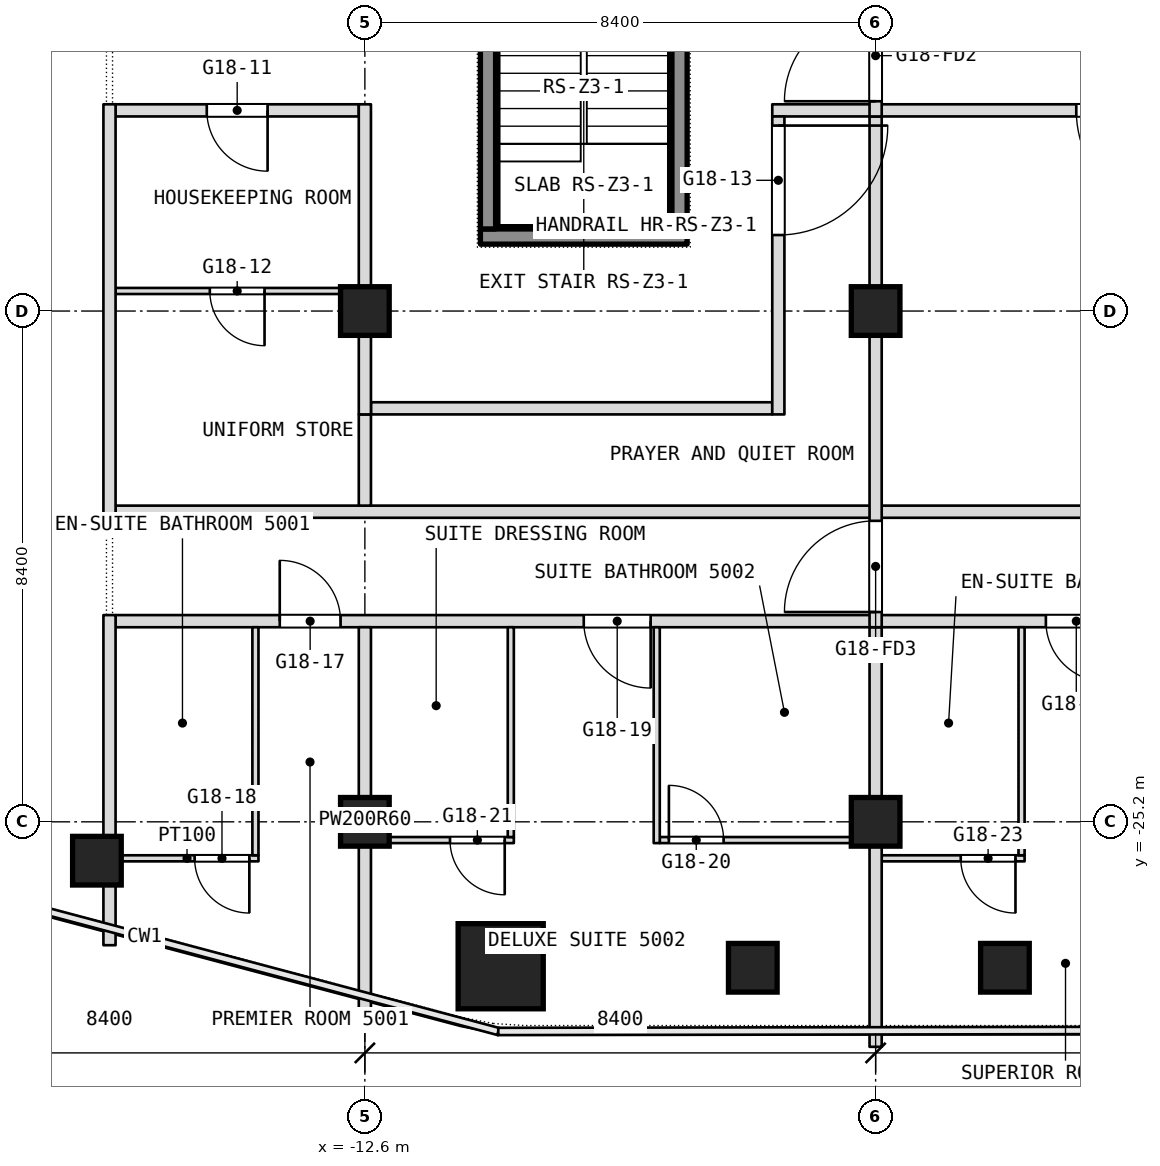
"""IFC4 building model, lengths in metres.
Left out: names, types, materials, properties, quantities, classifications, styles, units other than length and angle.
Written with IfcOpenShell. Run it as: python <this file> out.ifc"""

import sys

from ifc_helpers import new_model, si_unit, direction, frame, frame_2d, origin, origin_2d, place, context, subcontext, project, spatial, rectangle, extrude, element, fill, save


model = new_model("IFC4")
c1 = context("Model", 3, precision=1e-05, world=origin(), true_north=direction((0.0, 1.0)))
c2 = subcontext(c1, "Body", "Model", "MODEL_VIEW")
j1 = project(units=[si_unit("LENGTHUNIT", "METRE"), si_unit("PLANEANGLEUNIT", "RADIAN")], contexts=[c1])
p1 = place(None, origin())
s1 = spatial("IfcSite", under=j1, at=p1, CompositionType="ELEMENT")
p2 = place(p1, origin())
s2 = spatial("IfcBuilding", under=s1, at=p2, CompositionType="ELEMENT")
p3 = place(p2, frame((0.0, 0.0, 216.5)))
s3 = spatial("IfcBuildingStorey", under=s2, at=p3, CompositionType="ELEMENT", Elevation=216.5)
p4 = place(p3, frame((-10.366, -27.575, 0.0), z_axis=(0.0, 0.0, 1.0), x_axis=(1.0, 0.0, 0.0)))
e1 = element("IfcColumn", 1, at=p4, inside=s3, PredefinedType="COLUMN", context=c2, shape_type="SweptSolid", body=[
    extrude(rectangle(XDim=1.4, YDim=1.4, at=origin_2d()), origin(), (0.0, 0.0, 1.0), 3.6),
])
for number, where, z_axis, x_axis in (
    (2, (-12.6, -25.2, 0.0), (0.0, 0.0, 1.0), (1.0, 0.0, 0.0)),
    (3, (-12.6, -16.8, 0.0), (0.0, 0.0, 1.0), (1.0, 0.0, 0.0)),
    (4, (-4.2, -25.2, 0.0), (0.0, 0.0, 1.0), (1.0, 0.0, 0.0)),
    (5, (-4.2, -16.8, 0.0), (0.0, 0.0, 1.0), (1.0, 0.0, 0.0)),
    (6, (-2.073, -27.6, 0.0), (0.0, 0.0, 1.0), (1.0, 0.0, 0.0)),
    (7, (-6.22, -27.6, 0.0), (0.0, 0.0, 1.0), (1.0, 0.0, 0.0)),
    (8, (-17.007, -25.839, 0.0), (0.0, 0.0, 1.0), (1.0, 0.0, 0.0)),
):
    element("IfcColumn", number, at=place(p3, frame(where, z_axis=z_axis, x_axis=x_axis)), inside=s3, PredefinedType="COLUMN", context=c2, shape_type="SweptSolid", body=[
        extrude(rectangle(XDim=0.8, YDim=0.8, at=origin_2d()), origin(), (0.0, 0.0, 1.0), 3.6),
    ])
p5 = place(p3, frame((-16.7, -25.8, 0.0), z_axis=(0.0, 0.0, 1.0), x_axis=(1.0, 0.0, 0.0)))
e9 = element("IfcWall", 9, at=p5, inside=s3, PredefinedType="PARTITIONING", context=c2, shape_type="SweptSolid", body=[
    extrude(rectangle(XDim=2.35, YDim=0.1, at=frame_2d((1.175, 0.0))), origin(), (0.0, 0.0, 1.0), 3.34),
])
p6 = place(p5, frame((1.3, 0.0, 0.0)))
e10 = element("IfcOpeningElement", 10, at=p6, cuts=e9, PredefinedType="OPENING", context=c2, shape_type="SweptSolid", body=[
    extrude(rectangle(XDim=0.9, YDim=2.1, at=frame_2d((0.45, 1.05))), frame((0.0, 0.05, 0.0), z_axis=(0.0, -1.0, 0.0), x_axis=(1.0, 0.0, 0.0)), (0.0, 0.0, 1.0), 0.1),
])
p7 = place(p3, frame((-4.1, -25.8, 0.0), z_axis=(0.0, 0.0, 1.0), x_axis=(1.0, 0.0, 0.0)))
e11 = element("IfcWall", 11, at=p7, inside=s3, PredefinedType="PARTITIONING", context=c2, shape_type="SweptSolid", body=[
    extrude(rectangle(XDim=2.35, YDim=0.1, at=frame_2d((1.175, 0.0))), origin(), (0.0, 0.0, 1.0), 3.34),
])
p8 = place(p7, frame((1.3, 0.0, 0.0)))
e12 = element("IfcOpeningElement", 12, at=p8, cuts=e11, PredefinedType="OPENING", context=c2, shape_type="SweptSolid", body=[
    extrude(rectangle(XDim=0.9, YDim=2.1, at=frame_2d((0.45, 1.05))), frame((0.0, 0.05, 0.0), z_axis=(0.0, -1.0, 0.0), x_axis=(1.0, 0.0, 0.0)), (0.0, 0.0, 1.0), 0.1),
])
p9 = place(p3, frame((-12.5, -25.5, 0.0), z_axis=(0.0, 0.0, 1.0), x_axis=(1.0, 0.0, 0.0)))
e13 = element("IfcWall", 13, at=p9, inside=s3, PredefinedType="PARTITIONING", context=c2, shape_type="SweptSolid", body=[
    extrude(rectangle(XDim=2.35, YDim=0.1, at=frame_2d((1.175, 0.0))), origin(), (0.0, 0.0, 1.0), 3.34),
])
p10 = place(p9, frame((1.3, 0.0, 0.0)))
e14 = element("IfcOpeningElement", 14, at=p10, cuts=e13, PredefinedType="OPENING", context=c2, shape_type="SweptSolid", body=[
    extrude(rectangle(XDim=0.9, YDim=2.1, at=frame_2d((0.45, 1.05))), frame((0.0, 0.05, 0.0), z_axis=(0.0, -1.0, 0.0), x_axis=(1.0, 0.0, 0.0)), (0.0, 0.0, 1.0), 0.1),
])
p11 = place(p3, frame((-7.75, -25.5, 0.0), z_axis=(0.0, 0.0, 1.0), x_axis=(1.0, 0.0, 0.0)))
e15 = element("IfcWall", 15, at=p11, inside=s3, PredefinedType="PARTITIONING", context=c2, shape_type="SweptSolid", body=[
    extrude(rectangle(XDim=3.65, YDim=0.1, at=frame_2d((1.825, 0.0))), origin(), (0.0, 0.0, 1.0), 3.34),
])
p12 = place(p11, frame((0.15, 0.0, 0.0)))
e16 = element("IfcOpeningElement", 16, at=p12, cuts=e15, PredefinedType="OPENING", context=c2, shape_type="SweptSolid", body=[
    extrude(rectangle(XDim=0.9, YDim=2.1, at=frame_2d((0.45, 1.05))), frame((0.0, 0.05, 0.0), z_axis=(0.0, -1.0, 0.0), x_axis=(1.0, 0.0, 0.0)), (0.0, 0.0, 1.0), 0.1),
])
p13 = place(p3, frame((-16.7, -21.9, 0.0), z_axis=(0.0, 0.0, 1.0), x_axis=(1.0, 0.0, 0.0)))
e17 = element("IfcWall", 17, at=p13, inside=s3, PredefinedType="PARTITIONING", context=c2, shape_type="SweptSolid", body=[
    extrude(rectangle(XDim=33.4, YDim=0.2, at=frame_2d((16.7, 0.0))), origin(), (0.0, 0.0, 1.0), 3.34),
])
p14 = place(p13, frame((2.7, 0.0, 0.0)))
e18 = element("IfcOpeningElement", 18, at=p14, cuts=e17, PredefinedType="OPENING", context=c2, shape_type="SweptSolid", body=[
    extrude(rectangle(XDim=1.0, YDim=2.1, at=frame_2d((0.5, 1.05))), frame((0.0, 0.1, 0.0), z_axis=(0.0, -1.0, 0.0), x_axis=(1.0, 0.0, 0.0)), (0.0, 0.0, 1.0), 0.2),
])
p15 = place(p13, frame((7.7, 0.0, 0.0)))
e19 = element("IfcOpeningElement", 19, at=p15, cuts=e17, PredefinedType="OPENING", context=c2, shape_type="SweptSolid", body=[
    extrude(rectangle(XDim=1.1, YDim=2.1, at=frame_2d((0.55, 1.05))), frame((0.0, 0.1, 0.0), z_axis=(0.0, -1.0, 0.0), x_axis=(1.0, 0.0, 0.0)), (0.0, 0.0, 1.0), 0.2),
])
p16 = place(p13, frame((15.3, 0.0, 0.0)))
e20 = element("IfcOpeningElement", 20, at=p16, cuts=e17, PredefinedType="OPENING", context=c2, shape_type="SweptSolid", body=[
    extrude(rectangle(XDim=1.0, YDim=2.1, at=frame_2d((0.5, 1.05))), frame((0.0, 0.1, 0.0), z_axis=(0.0, -1.0, 0.0), x_axis=(1.0, 0.0, 0.0)), (0.0, 0.0, 1.0), 0.2),
])
p17 = place(p13, frame((17.1, 0.0, 0.0)))
e21 = element("IfcOpeningElement", 21, at=p17, cuts=e17, PredefinedType="OPENING", context=c2, shape_type="SweptSolid", body=[
    extrude(rectangle(XDim=1.0, YDim=2.1, at=frame_2d((0.5, 1.05))), frame((0.0, 0.1, 0.0), z_axis=(0.0, -1.0, 0.0), x_axis=(1.0, 0.0, 0.0)), (0.0, 0.0, 1.0), 0.2),
])
p18 = place(p13, frame((24.5, 0.0, 0.0)))
e22 = element("IfcOpeningElement", 22, at=p18, cuts=e17, PredefinedType="OPENING", context=c2, shape_type="SweptSolid", body=[
    extrude(rectangle(XDim=1.1, YDim=2.1, at=frame_2d((0.55, 1.05))), frame((0.0, 0.1, 0.0), z_axis=(0.0, -1.0, 0.0), x_axis=(1.0, 0.0, 0.0)), (0.0, 0.0, 1.0), 0.2),
])
p19 = place(p13, frame((32.1, 0.0, 0.0)))
e23 = element("IfcOpeningElement", 23, at=p19, cuts=e17, PredefinedType="OPENING", context=c2, shape_type="SweptSolid", body=[
    extrude(rectangle(XDim=1.0, YDim=2.1, at=frame_2d((0.5, 1.05))), frame((0.0, 0.1, 0.0), z_axis=(0.0, -1.0, 0.0), x_axis=(1.0, 0.0, 0.0)), (0.0, 0.0, 1.0), 0.2),
])
p20 = place(p3, frame((-16.7, -20.1, 0.0), z_axis=(0.0, 0.0, 1.0), x_axis=(1.0, 0.0, 0.0)))
e24 = element("IfcWall", 24, at=p20, inside=s3, PredefinedType="PARTITIONING", context=c2, shape_type="SweptSolid", body=[
    extrude(rectangle(XDim=33.4, YDim=0.2, at=frame_2d((16.7, 0.0))), origin(), (0.0, 0.0, 1.0), 3.34),
])
p21 = place(p3, frame((-12.5, -18.4, 0.0), z_axis=(0.0, 0.0, 1.0), x_axis=(1.0, 0.0, 0.0)))
e25 = element("IfcWall", 25, at=p21, inside=s3, PredefinedType="PARTITIONING", context=c2, shape_type="SweptSolid", body=[
    extrude(rectangle(XDim=6.6, YDim=0.2, at=frame_2d((3.3, 0.0))), origin(), (0.0, 0.0, 1.0), 3.34),
])
p22 = place(p3, frame((-16.7, -16.47, 0.0), z_axis=(0.0, 0.0, 1.0), x_axis=(1.0, 0.0, 0.0)))
e26 = element("IfcWall", 26, at=p22, inside=s3, PredefinedType="PARTITIONING", context=c2, shape_type="SweptSolid", body=[
    extrude(rectangle(XDim=4.0, YDim=0.1, at=frame_2d((2.0, 0.0))), origin(), (0.0, 0.0, 1.0), 3.34),
])
p23 = place(p22, frame((1.55, 0.0, 0.0)))
e27 = element("IfcOpeningElement", 27, at=p23, cuts=e26, PredefinedType="OPENING", context=c2, shape_type="SweptSolid", body=[
    extrude(rectangle(XDim=0.9, YDim=2.1, at=frame_2d((0.45, 1.05))), frame((0.0, 0.05, 0.0), z_axis=(0.0, -1.0, 0.0), x_axis=(1.0, 0.0, 0.0)), (0.0, 0.0, 1.0), 0.1),
])
p24 = place(p3, frame((-16.7, -13.5, 0.0), z_axis=(0.0, 0.0, 1.0), x_axis=(1.0, 0.0, 0.0)))
e28 = element("IfcWall", 28, at=p24, inside=s3, PredefinedType="PARTITIONING", context=c2, shape_type="SweptSolid", body=[
    extrude(rectangle(XDim=4.0, YDim=0.2, at=frame_2d((2.0, 0.0))), origin(), (0.0, 0.0, 1.0), 3.34),
])
p25 = place(p24, frame((1.5, 0.0, 0.0)))
e29 = element("IfcOpeningElement", 29, at=p25, cuts=e28, PredefinedType="OPENING", context=c2, shape_type="SweptSolid", body=[
    extrude(rectangle(XDim=1.0, YDim=2.1, at=frame_2d((0.5, 1.05))), frame((0.0, 0.1, 0.0), z_axis=(0.0, -1.0, 0.0), x_axis=(1.0, 0.0, 0.0)), (0.0, 0.0, 1.0), 0.2),
])
p26 = place(p3, frame((-5.9, -13.5, 0.0), z_axis=(0.0, 0.0, 1.0), x_axis=(1.0, 0.0, 0.0)))
e30 = element("IfcWall", 30, at=p26, inside=s3, PredefinedType="PARTITIONING", context=c2, shape_type="SweptSolid", body=[
    extrude(rectangle(XDim=11.6, YDim=0.2, at=frame_2d((5.8, 0.0))), origin(), (0.0, 0.0, 1.0), 3.34),
])
p27 = place(p26, frame((5.0, 0.0, 0.0)))
e31 = element("IfcOpeningElement", 31, at=p27, cuts=e30, PredefinedType="OPENING", context=c2, shape_type="SweptSolid", body=[
    extrude(rectangle(XDim=1.8, YDim=2.1, at=frame_2d((0.9, 1.05))), frame((0.0, 0.1, 0.0), z_axis=(0.0, -1.0, 0.0), x_axis=(1.0, 0.0, 0.0)), (0.0, 0.0, 1.0), 0.2),
])
p28 = place(p3, frame((-1.8, -25.75, 0.0), z_axis=(0.0, 0.0, 1.0), x_axis=(0.0, 1.0, 0.0)))
e32 = element("IfcWall", 32, at=p28, inside=s3, PredefinedType="PARTITIONING", context=c2, shape_type="SweptSolid", body=[
    extrude(rectangle(XDim=3.75, YDim=0.1, at=frame_2d((1.875, 0.0))), origin(), (0.0, 0.0, 1.0), 3.34),
])
p29 = place(p3, frame((-4.2, -28.9, 0.0), z_axis=(0.0, 0.0, 1.0), x_axis=(0.0, 1.0, 0.0)))
e33 = element("IfcWall", 33, at=p29, inside=s3, PredefinedType="PARTITIONING", context=c2, shape_type="SweptSolid", body=[
    extrude(rectangle(XDim=6.9, YDim=0.2, at=frame_2d((3.45, 0.0))), origin(), (0.0, 0.0, 1.0), 3.34),
])
p30 = place(p3, frame((-4.2, -22.0, 0.0), z_axis=(0.0, 0.0, 1.0), x_axis=(0.0, 1.0, 0.0)))
e34 = element("IfcWall", 34, at=p30, inside=s3, PredefinedType="PARTITIONING", context=c2, shape_type="SweptSolid", body=[
    extrude(rectangle(XDim=8.4, YDim=0.2, at=frame_2d((4.2, 0.0))), origin(), (0.0, 0.0, 1.0), 3.34),
])
p31 = place(p30, frame((0.25, 0.0, 0.0)))
e35 = element("IfcOpeningElement", 35, at=p31, cuts=e34, PredefinedType="OPENING", context=c2, shape_type="SweptSolid", body=[
    extrude(rectangle(XDim=1.5, YDim=2.1, at=frame_2d((0.75, 1.05))), frame((0.0, 0.1, 0.0), z_axis=(0.0, -1.0, 0.0), x_axis=(1.0, 0.0, 0.0)), (0.0, 0.0, 1.0), 0.2),
])
p32 = place(p3, frame((-4.2, -13.6, 0.0), z_axis=(0.0, 0.0, 1.0), x_axis=(0.0, 1.0, 0.0)))
e36 = element("IfcWall", 36, at=p32, inside=s3, PredefinedType="PARTITIONING", context=c2, shape_type="SweptSolid", body=[
    extrude(rectangle(XDim=13.6, YDim=0.2, at=frame_2d((6.8, 0.0))), origin(), (0.0, 0.0, 1.0), 3.34),
])
p33 = place(p32, frame((11.95, 0.0, 0.0)))
e37 = element("IfcOpeningElement", 37, at=p33, cuts=e36, PredefinedType="OPENING", context=c2, shape_type="SweptSolid", body=[
    extrude(rectangle(XDim=1.5, YDim=2.1, at=frame_2d((0.75, 1.05))), frame((0.0, 0.1, 0.0), z_axis=(0.0, -1.0, 0.0), x_axis=(1.0, 0.0, 0.0)), (0.0, 0.0, 1.0), 0.2),
])
p34 = place(p32, frame((0.25, 0.0, 0.0)))
e38 = element("IfcOpeningElement", 38, at=p34, cuts=e36, PredefinedType="OPENING", context=c2, shape_type="SweptSolid", body=[
    extrude(rectangle(XDim=1.5, YDim=2.1, at=frame_2d((0.75, 1.05))), frame((0.0, 0.1, 0.0), z_axis=(0.0, -1.0, 0.0), x_axis=(1.0, 0.0, 0.0)), (0.0, 0.0, 1.0), 0.2),
])
p35 = place(p3, frame((-5.8, -18.5, 0.0), z_axis=(0.0, 0.0, 1.0), x_axis=(0.0, 1.0, 0.0)))
e39 = element("IfcWall", 39, at=p35, inside=s3, PredefinedType="PARTITIONING", context=c2, shape_type="SweptSolid", body=[
    extrude(rectangle(XDim=4.9, YDim=0.2, at=frame_2d((2.45, 0.0))), origin(), (0.0, 0.0, 1.0), 3.34),
])
p36 = place(p35, frame((2.95, 0.0, 0.0)))
e40 = element("IfcOpeningElement", 40, at=p36, cuts=e39, PredefinedType="OPENING", context=c2, shape_type="SweptSolid", body=[
    extrude(rectangle(XDim=1.8, YDim=2.1, at=frame_2d((0.9, 1.05))), frame((0.0, 0.1, 0.0), z_axis=(0.0, -1.0, 0.0), x_axis=(1.0, 0.0, 0.0)), (0.0, 0.0, 1.0), 0.2),
])
p37 = place(p3, frame((-7.8, -25.55, 0.0), z_axis=(0.0, 0.0, 1.0), x_axis=(0.0, 1.0, 0.0)))
e41 = element("IfcWall", 41, at=p37, inside=s3, PredefinedType="PARTITIONING", context=c2, shape_type="SweptSolid", body=[
    extrude(rectangle(XDim=3.55, YDim=0.1, at=frame_2d((1.775, 0.0))), origin(), (0.0, 0.0, 1.0), 3.34),
])
p38 = place(p3, frame((-10.2, -25.45, 0.0), z_axis=(0.0, 0.0, 1.0), x_axis=(0.0, 1.0, 0.0)))
e42 = element("IfcWall", 42, at=p38, inside=s3, PredefinedType="PARTITIONING", context=c2, shape_type="SweptSolid", body=[
    extrude(rectangle(XDim=3.45, YDim=0.1, at=frame_2d((1.725, 0.0))), origin(), (0.0, 0.0, 1.0), 3.34),
])
p39 = place(p3, frame((-12.6, -28.343, 0.0), z_axis=(0.0, 0.0, 1.0), x_axis=(0.0, 1.0, 0.0)))
e43 = element("IfcWall", 43, at=p39, inside=s3, PredefinedType="PARTITIONING", context=c2, shape_type="SweptSolid", body=[
    extrude(rectangle(XDim=6.343, YDim=0.2, at=frame_2d((3.171, 0.0))), origin(), (0.0, 0.0, 1.0), 3.34),
])
p40 = place(p3, frame((-12.6, -20.0, 0.0), z_axis=(0.0, 0.0, 1.0), x_axis=(0.0, 1.0, 0.0)))
e44 = element("IfcWall", 44, at=p40, inside=s3, PredefinedType="PARTITIONING", context=c2, shape_type="SweptSolid", body=[
    extrude(rectangle(XDim=1.5, YDim=0.2, at=frame_2d((0.75, 0.0))), origin(), (0.0, 0.0, 1.0), 3.34),
])
p41 = place(p3, frame((-12.6, -18.5, 0.0), z_axis=(0.0, 0.0, 1.0), x_axis=(0.0, 1.0, 0.0)))
e45 = element("IfcWall", 45, at=p41, inside=s3, PredefinedType="PARTITIONING", context=c2, shape_type="SweptSolid", body=[
    extrude(rectangle(XDim=5.1, YDim=0.2, at=frame_2d((2.55, 0.0))), origin(), (0.0, 0.0, 1.0), 3.34),
])
p42 = place(p3, frame((-14.4, -25.75, 0.0), z_axis=(0.0, 0.0, 1.0), x_axis=(0.0, 1.0, 0.0)))
e46 = element("IfcWall", 46, at=p42, inside=s3, PredefinedType="PARTITIONING", context=c2, shape_type="SweptSolid", body=[
    extrude(rectangle(XDim=3.75, YDim=0.1, at=frame_2d((1.875, 0.0))), origin(), (0.0, 0.0, 1.0), 3.34),
])
p43 = place(p3, frame((-16.8, -27.229, 0.0), z_axis=(0.0, 0.0, 1.0), x_axis=(0.0, 1.0, 0.0)))
e47 = element("IfcWall", 47, at=p43, inside=s3, PredefinedType="PARTITIONING", context=c2, shape_type="SweptSolid", body=[
    extrude(rectangle(XDim=5.429, YDim=0.2, at=frame_2d((2.714, 0.0))), origin(), (0.0, 0.0, 1.0), 3.34),
])
p44 = place(p3, frame((-16.8, -20.2, 0.0), z_axis=(0.0, 0.0, 1.0), x_axis=(0.0, 1.0, 0.0)))
e48 = element("IfcWall", 48, at=p44, inside=s3, PredefinedType="PARTITIONING", context=c2, shape_type="SweptSolid", body=[
    extrude(rectangle(XDim=6.8, YDim=0.2, at=frame_2d((3.4, 0.0))), origin(), (0.0, 0.0, 1.0), 3.34),
])
p45 = place(p3, frame((-10.7, -15.575, 0.1), z_axis=(0.0, 0.0, 1.0), x_axis=(1.0, 0.0, 0.0)))
e49 = element("IfcWall", 49, at=p45, inside=s3, PredefinedType="SHEAR", context=c2, shape_type="SweptSolid", body=[
    extrude(rectangle(XDim=3.4, YDim=0.25, at=frame_2d((1.7, 0.0))), origin(), (0.0, 0.0, 1.0), 3.6),
])
for number, where, z_axis, x_axis in (
    (50, (-10.575, -15.45, 0.1), (0.0, 0.0, 1.0), (0.0, 1.0, 0.0)),
    (51, (-7.425, -15.45, 0.1), (0.0, 0.0, 1.0), (0.0, 1.0, 0.0)),
):
    element("IfcWall", number, at=place(p3, frame(where, z_axis=z_axis, x_axis=x_axis)), inside=s3, PredefinedType="SHEAR", context=c2, shape_type="SweptSolid", body=[
        extrude(rectangle(XDim=5.7, YDim=0.25, at=frame_2d((2.85, 0.0))), origin(), (0.0, 0.0, 1.0), 3.6),
    ])
p46 = place(p6, origin())
e52 = element("IfcDoor", 52, at=p46, inside=s3, OperationType="SINGLE_SWING_RIGHT", PredefinedType="DOOR", context=c2, shape_type="SweptSolid", body=[
    extrude(rectangle(XDim=0.9, YDim=2.1, at=frame_2d((0.45, 1.05))), frame((0.0, 0.025, 0.0), z_axis=(0.0, -1.0, 0.0), x_axis=(1.0, 0.0, 0.0)), (0.0, 0.0, 1.0), 0.05),
])
fill(e10, e52)
p47 = place(p8, origin())
e53 = element("IfcDoor", 53, at=p47, inside=s3, OperationType="SINGLE_SWING_RIGHT", PredefinedType="DOOR", context=c2, shape_type="SweptSolid", body=[
    extrude(rectangle(XDim=0.9, YDim=2.1, at=frame_2d((0.45, 1.05))), frame((0.0, 0.025, 0.0), z_axis=(0.0, -1.0, 0.0), x_axis=(1.0, 0.0, 0.0)), (0.0, 0.0, 1.0), 0.05),
])
fill(e12, e53)
p48 = place(p10, origin())
e54 = element("IfcDoor", 54, at=p48, inside=s3, OperationType="SINGLE_SWING_RIGHT", PredefinedType="DOOR", context=c2, shape_type="SweptSolid", body=[
    extrude(rectangle(XDim=0.9, YDim=2.1, at=frame_2d((0.45, 1.05))), frame((0.0, 0.025, 0.0), z_axis=(0.0, -1.0, 0.0), x_axis=(1.0, 0.0, 0.0)), (0.0, 0.0, 1.0), 0.05),
])
fill(e14, e54)
p49 = place(p12, origin())
e55 = element("IfcDoor", 55, at=p49, inside=s3, OperationType="SINGLE_SWING_LEFT", PredefinedType="DOOR", context=c2, shape_type="SweptSolid", body=[
    extrude(rectangle(XDim=0.9, YDim=2.1, at=frame_2d((0.45, 1.05))), frame((0.0, 0.025, 0.0), z_axis=(0.0, -1.0, 0.0), x_axis=(1.0, 0.0, 0.0)), (0.0, 0.0, 1.0), 0.05),
])
fill(e16, e55)
p50 = place(p14, origin())
e56 = element("IfcDoor", 56, at=p50, inside=s3, OperationType="SINGLE_SWING_LEFT", PredefinedType="DOOR", context=c2, shape_type="SweptSolid", body=[
    extrude(rectangle(XDim=1.0, YDim=2.1, at=frame_2d((0.5, 1.05))), frame((0.0, 0.025, 0.0), z_axis=(0.0, -1.0, 0.0), x_axis=(1.0, 0.0, 0.0)), (0.0, 0.0, 1.0), 0.05),
])
fill(e18, e56)
p51 = place(p15, origin())
e57 = element("IfcDoor", 57, at=p51, inside=s3, OperationType="SINGLE_SWING_LEFT", PredefinedType="DOOR", context=c2, shape_type="SweptSolid", body=[
    extrude(rectangle(XDim=1.1, YDim=2.1, at=frame_2d((0.55, 1.05))), frame((0.0, 0.025, 0.0), z_axis=(0.0, -1.0, 0.0), x_axis=(1.0, 0.0, 0.0)), (0.0, 0.0, 1.0), 0.05),
])
fill(e19, e57)
p52 = place(p16, origin())
e58 = element("IfcDoor", 58, at=p52, inside=s3, OperationType="SINGLE_SWING_RIGHT", PredefinedType="DOOR", context=c2, shape_type="SweptSolid", body=[
    extrude(rectangle(XDim=1.0, YDim=2.1, at=frame_2d((0.5, 1.05))), frame((0.0, 0.025, 0.0), z_axis=(0.0, -1.0, 0.0), x_axis=(1.0, 0.0, 0.0)), (0.0, 0.0, 1.0), 0.05),
])
fill(e20, e58)
p53 = place(p23, origin())
e59 = element("IfcDoor", 59, at=p53, inside=s3, OperationType="SINGLE_SWING_LEFT", PredefinedType="DOOR", context=c2, shape_type="SweptSolid", body=[
    extrude(rectangle(XDim=0.9, YDim=2.1, at=frame_2d((0.45, 1.05))), frame((0.0, 0.025, 0.0), z_axis=(0.0, -1.0, 0.0), x_axis=(1.0, 0.0, 0.0)), (0.0, 0.0, 1.0), 0.05),
])
fill(e27, e59)
p54 = place(p25, origin())
e60 = element("IfcDoor", 60, at=p54, inside=s3, OperationType="SINGLE_SWING_LEFT", PredefinedType="DOOR", context=c2, shape_type="SweptSolid", body=[
    extrude(rectangle(XDim=1.0, YDim=2.1, at=frame_2d((0.5, 1.05))), frame((0.0, 0.025, 0.0), z_axis=(0.0, -1.0, 0.0), x_axis=(1.0, 0.0, 0.0)), (0.0, 0.0, 1.0), 0.05),
])
fill(e29, e60)
p55 = place(p27, origin())
e61 = element("IfcDoor", 61, at=p55, inside=s3, OperationType="DOUBLE_DOOR_SINGLE_SWING", PredefinedType="DOOR", context=c2, shape_type="SweptSolid", body=[
    extrude(rectangle(XDim=1.8, YDim=2.1, at=frame_2d((0.9, 1.05))), frame((0.0, 0.025, 0.0), z_axis=(0.0, -1.0, 0.0), x_axis=(1.0, 0.0, 0.0)), (0.0, 0.0, 1.0), 0.05),
])
fill(e31, e61)
p56 = place(p36, origin())
e62 = element("IfcDoor", 62, at=p56, inside=s3, OperationType="DOUBLE_DOOR_SINGLE_SWING", PredefinedType="DOOR", context=c2, shape_type="SweptSolid", body=[
    extrude(rectangle(XDim=1.8, YDim=2.1, at=frame_2d((0.9, 1.05))), frame((0.0, 0.025, 0.0), z_axis=(0.0, -1.0, 0.0), x_axis=(1.0, 0.0, 0.0)), (0.0, 0.0, 1.0), 0.05),
])
fill(e40, e62)
p57 = place(p34, origin())
e63 = element("IfcDoor", 63, at=p57, inside=s3, OperationType="DOUBLE_DOOR_DOUBLE_SWING", PredefinedType="DOOR", context=c2, shape_type="SweptSolid", body=[
    extrude(rectangle(XDim=1.5, YDim=2.1, at=frame_2d((0.75, 1.05))), frame((0.0, 0.025, 0.0), z_axis=(0.0, -1.0, 0.0), x_axis=(1.0, 0.0, 0.0)), (0.0, 0.0, 1.0), 0.05),
])
fill(e38, e63)
p58 = place(p31, origin())
e64 = element("IfcDoor", 64, at=p58, inside=s3, OperationType="DOUBLE_DOOR_DOUBLE_SWING", PredefinedType="DOOR", context=c2, shape_type="SweptSolid", body=[
    extrude(rectangle(XDim=1.5, YDim=2.1, at=frame_2d((0.75, 1.05))), frame((0.0, 0.025, 0.0), z_axis=(0.0, -1.0, 0.0), x_axis=(1.0, 0.0, 0.0)), (0.0, 0.0, 1.0), 0.05),
])
fill(e35, e64)
save(model, sys.argv[1])
